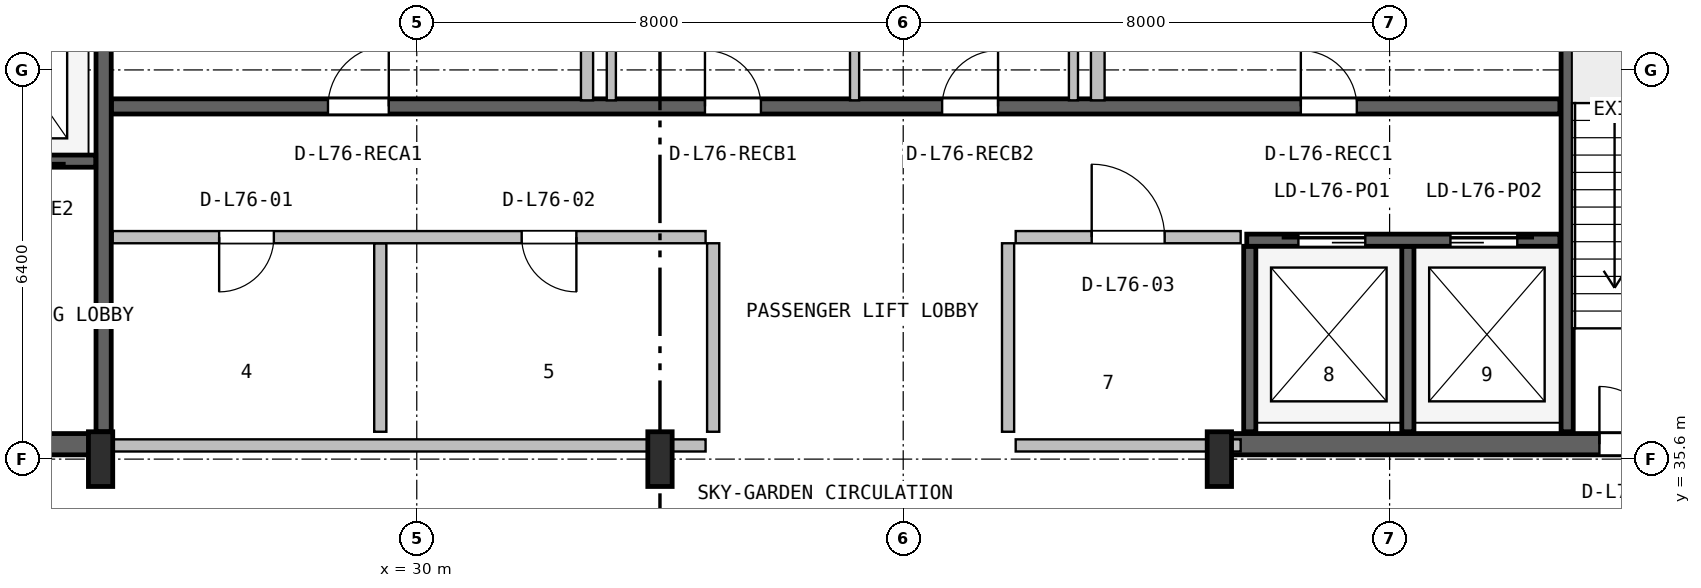
"""IFC4 building model, lengths in metres.
Left out: names, types, materials, properties, quantities, classifications, styles, units other than length and angle.
Written with IfcOpenShell. Run it as: python <this file> out.ifc"""

import sys

from ifc_helpers import new_model, si_unit, direction, frame, frame_2d, origin, origin_2d, place, context, subcontext, project, spatial, rectangle, i_section, extrude, source, transform, mapped, element, fill, save


model = new_model("IFC4")
c1 = context("Model", 3, precision=1e-05, world=origin(), true_north=direction((0.0, 1.0)))
c2 = subcontext(c1, "Body", "Model", "MODEL_VIEW")
j1 = project(units=[si_unit("LENGTHUNIT", "METRE"), si_unit("PLANEANGLEUNIT", "RADIAN")], contexts=[c1])
p1 = place(None, origin())
s1 = spatial("IfcSite", under=j1, at=p1, CompositionType="ELEMENT")
p2 = place(p1, origin())
s2 = spatial("IfcBuilding", under=s1, at=p2, CompositionType="ELEMENT")
p3 = place(p2, frame((0.0, 0.0, 305.0)))
s3 = spatial("IfcBuildingStorey", under=s2, at=p3, CompositionType="ELEMENT", Elevation=305.0)
p4 = place(p3, frame((15.67, 35.845, 0.0), z_axis=(0.0, 0.0, 1.0), x_axis=(1.0, 0.0, 0.0)))
e1 = element("IfcWall", 1, at=p4, inside=s3, PredefinedType="SHEAR", context=c2, shape_type="SweptSolid", body=[
    extrude(rectangle(XDim=9.13, YDim=0.35, at=frame_2d((4.565, 0.0))), origin(), (0.0, 0.0, 1.0), 4.52),
])
p5 = place(p4, frame((5.4, 0.0, 0.0)))
e2 = element("IfcOpeningElement", 2, at=p5, cuts=e1, PredefinedType="OPENING", context=c2, shape_type="SweptSolid", body=[
    extrude(rectangle(XDim=1.0, YDim=2.1, at=frame_2d((0.5, 1.05))), frame((0.0, 0.185, 0.0), z_axis=(0.0, -1.0, 0.0), x_axis=(1.0, 0.0, 0.0)), (0.0, 0.0, 1.0), 0.37),
])
p6 = place(p3, frame((43.2, 35.845, 0.0), z_axis=(0.0, 0.0, 1.0), x_axis=(1.0, 0.0, 0.0)))
e3 = element("IfcWall", 3, at=p6, inside=s3, PredefinedType="SHEAR", context=c2, shape_type="SweptSolid", body=[
    extrude(rectangle(XDim=9.13, YDim=0.35, at=frame_2d((4.565, 0.0))), origin(), (0.0, 0.0, 1.0), 4.52),
])
p7 = place(p6, frame((6.25, 0.0, 0.0)))
e4 = element("IfcOpeningElement", 4, at=p7, cuts=e3, PredefinedType="OPENING", context=c2, shape_type="SweptSolid", body=[
    extrude(rectangle(XDim=0.95, YDim=2.1, at=frame_2d((0.475, 1.05))), frame((0.0, 0.185, 0.0), z_axis=(0.0, -1.0, 0.0), x_axis=(1.0, 0.0, 0.0)), (0.0, 0.0, 1.0), 0.37),
])
m1 = source(origin(), c2, "Body", "SweptSolid", [
    extrude(i_section(OverallWidth=0.4, OverallDepth=0.9, WebThickness=0.016, FlangeThickness=0.028, FilletRadius=0.016, at=origin_2d()), origin(), (0.0, 0.0, 1.0), 4.8),
])
for number, where, z_axis, x_axis in (
    (5, (24.8, 35.6, 0.0), (0.0, 0.0, 1.0), (1.0, 0.0, 0.0)),
    (6, (34.0, 35.6, 0.0), (0.0, 0.0, 1.0), (1.0, 0.0, 0.0)),
    (7, (43.2, 35.6, 0.0), (0.0, 0.0, 1.0), (1.0, 0.0, 0.0)),
):
    element("IfcColumn", number, at=place(p3, frame(where, z_axis=z_axis, x_axis=x_axis)), inside=s3, PredefinedType="COLUMN", context=c2, shape_type="MappedRepresentation", body=[
        mapped(m1, transform((0.0, 0.0, 0.0), x_axis=(1.0, 0.0, 0.0), y_axis=(0.0, 1.0, 0.0), z_axis=(0.0, 0.0, 1.0), scale=1.0)),
    ])
p8 = place(p3, frame((24.85, 36.05, 0.0), z_axis=(0.0, 0.0, 1.0), x_axis=(0.0, 1.0, 0.0)))
e8 = element("IfcWall", 8, at=p8, inside=s3, PredefinedType="SHEAR", context=c2, shape_type="SweptSolid", body=[
    extrude(rectangle(XDim=10.45, YDim=0.25, at=frame_2d((5.225, 0.0))), origin(), (0.0, 0.0, 1.0), 4.52),
])
p9 = place(p3, frame((19.2, 40.5, 0.0), z_axis=(0.0, 0.0, 1.0), x_axis=(1.0, 0.0, 0.0)))
e9 = element("IfcWall", 9, at=p9, inside=s3, PredefinedType="SHEAR", context=c2, shape_type="SweptSolid", body=[
    extrude(rectangle(XDim=5.52, YDim=0.2, at=frame_2d((2.76, 0.0))), origin(), (0.0, 0.0, 1.0), 4.52),
])
p10 = place(p9, frame((1.05, 0.0, 0.0)))
e10 = element("IfcOpeningElement", 10, at=p10, cuts=e9, PredefinedType="OPENING", context=c2, shape_type="SweptSolid", body=[
    extrude(rectangle(XDim=1.1, YDim=2.18, at=frame_2d((0.55, 1.09))), frame((0.0, 0.11, 0.0), z_axis=(0.0, -1.0, 0.0), x_axis=(1.0, 0.0, 0.0)), (0.0, 0.0, 1.0), 0.22),
])
p11 = place(p9, frame((3.65, 0.0, 0.0)))
e11 = element("IfcOpeningElement", 11, at=p11, cuts=e9, PredefinedType="OPENING", context=c2, shape_type="SweptSolid", body=[
    extrude(rectangle(XDim=1.1, YDim=2.18, at=frame_2d((0.55, 1.09))), frame((0.0, 0.11, 0.0), z_axis=(0.0, -1.0, 0.0), x_axis=(1.0, 0.0, 0.0)), (0.0, 0.0, 1.0), 0.22),
])
p12 = place(p3, frame((48.92, 36.05, 0.0), z_axis=(0.0, 0.0, 1.0), x_axis=(0.0, 1.0, 0.0)))
e12 = element("IfcWall", 12, at=p12, inside=s3, PredefinedType="SHEAR", context=c2, shape_type="SweptSolid", body=[
    extrude(rectangle(XDim=10.5, YDim=0.2, at=frame_2d((5.25, 0.0))), origin(), (0.0, 0.0, 1.0), 4.52),
])
p13 = place(p3, frame((24.98, 41.4, 0.0), z_axis=(0.0, 0.0, 1.0), x_axis=(1.0, 0.0, 0.0)))
e13 = element("IfcWall", 13, at=p13, inside=s3, PredefinedType="SHEAR", context=c2, shape_type="SweptSolid", body=[
    extrude(rectangle(XDim=23.82, YDim=0.25, at=frame_2d((11.91, 0.0))), origin(), (0.0, 0.0, 1.0), 4.52),
])
p14 = place(p13, frame((3.56, 0.0, 0.0)))
e14 = element("IfcOpeningElement", 14, at=p14, cuts=e13, PredefinedType="OPENING", context=c2, shape_type="SweptSolid", body=[
    extrude(rectangle(XDim=1.0, YDim=2.08, at=frame_2d((0.5, 1.04))), frame((0.0, 0.135, 0.0), z_axis=(0.0, -1.0, 0.0), x_axis=(1.0, 0.0, 0.0)), (0.0, 0.0, 1.0), 0.27),
])
p15 = place(p13, frame((9.76, 0.0, 0.0)))
e15 = element("IfcOpeningElement", 15, at=p15, cuts=e13, PredefinedType="OPENING", context=c2, shape_type="SweptSolid", body=[
    extrude(rectangle(XDim=0.92, YDim=2.08, at=frame_2d((0.46, 1.04))), frame((0.0, 0.135, 0.0), z_axis=(0.0, -1.0, 0.0), x_axis=(1.0, 0.0, 0.0)), (0.0, 0.0, 1.0), 0.27),
])
p16 = place(p13, frame((13.66, 0.0, 0.0)))
e16 = element("IfcOpeningElement", 16, at=p16, cuts=e13, PredefinedType="OPENING", context=c2, shape_type="SweptSolid", body=[
    extrude(rectangle(XDim=0.92, YDim=2.08, at=frame_2d((0.46, 1.04))), frame((0.0, 0.135, 0.0), z_axis=(0.0, -1.0, 0.0), x_axis=(1.0, 0.0, 0.0)), (0.0, 0.0, 1.0), 0.27),
])
p17 = place(p13, frame((19.56, 0.0, 0.0)))
e17 = element("IfcOpeningElement", 17, at=p17, cuts=e13, PredefinedType="OPENING", context=c2, shape_type="SweptSolid", body=[
    extrude(rectangle(XDim=0.92, YDim=2.08, at=frame_2d((0.46, 1.04))), frame((0.0, 0.135, 0.0), z_axis=(0.0, -1.0, 0.0), x_axis=(1.0, 0.0, 0.0)), (0.0, 0.0, 1.0), 0.27),
])
for number, where, z_axis, x_axis in (
    (18, (43.7, 36.05, 0.0), (0.0, 0.0, 1.0), (0.0, 1.0, 0.0)),
    (19, (46.3, 36.05, 0.0), (0.0, 0.0, 1.0), (0.0, 1.0, 0.0)),
):
    element("IfcWall", number, at=place(p3, frame(where, z_axis=z_axis, x_axis=x_axis)), inside=s3, PredefinedType="SHEAR", context=c2, shape_type="SweptSolid", body=[
        extrude(rectangle(XDim=3.05, YDim=0.2, at=frame_2d((1.525, 0.0))), origin(), (0.0, 0.0, 1.0), 4.52),
    ])
p18 = place(p3, frame((43.65, 39.2, 0.0), z_axis=(0.0, 0.0, 1.0), x_axis=(1.0, 0.0, 0.0)))
e20 = element("IfcWall", 20, at=p18, inside=s3, PredefinedType="SHEAR", context=c2, shape_type="SweptSolid", body=[
    extrude(rectangle(XDim=5.15, YDim=0.2, at=frame_2d((2.575, 0.0))), origin(), (0.0, 0.0, 1.0), 4.52),
])
p19 = place(p18, frame((0.85, 0.0, 0.0)))
e21 = element("IfcOpeningElement", 21, at=p19, cuts=e20, PredefinedType="OPENING", context=c2, shape_type="SweptSolid", body=[
    extrude(rectangle(XDim=1.1, YDim=2.18, at=frame_2d((0.55, 1.09))), frame((0.0, 0.11, 0.0), z_axis=(0.0, -1.0, 0.0), x_axis=(1.0, 0.0, 0.0)), (0.0, 0.0, 1.0), 0.22),
])
p20 = place(p18, frame((3.35, 0.0, 0.0)))
e22 = element("IfcOpeningElement", 22, at=p20, cuts=e20, PredefinedType="OPENING", context=c2, shape_type="SweptSolid", body=[
    extrude(rectangle(XDim=1.1, YDim=2.18, at=frame_2d((0.55, 1.09))), frame((0.0, 0.11, 0.0), z_axis=(0.0, -1.0, 0.0), x_axis=(1.0, 0.0, 0.0)), (0.0, 0.0, 1.0), 0.22),
])
p21 = place(p3, frame((25.0, 35.825, 0.0), z_axis=(0.0, 0.0, 1.0), x_axis=(1.0, 0.0, 0.0)))
e23 = element("IfcWall", 23, at=p21, inside=s3, PredefinedType="PLUMBINGWALL", context=c2, shape_type="SweptSolid", body=[
    extrude(rectangle(XDim=9.75, YDim=0.2, at=frame_2d((4.875, 0.0))), origin(), (0.0, 0.0, 1.0), 3.545),
])
p22 = place(p3, frame((29.4, 36.05, 0.0), z_axis=(0.0, 0.0, 1.0), x_axis=(0.0, 1.0, 0.0)))
e24 = element("IfcWall", 24, at=p22, inside=s3, PredefinedType="PLUMBINGWALL", context=c2, shape_type="SweptSolid", body=[
    extrude(rectangle(XDim=3.1, YDim=0.2, at=frame_2d((1.55, 0.0))), origin(), (0.0, 0.0, 1.0), 4.5),
])
p23 = place(p3, frame((25.0, 39.25, 0.0), z_axis=(0.0, 0.0, 1.0), x_axis=(1.0, 0.0, 0.0)))
e25 = element("IfcWall", 25, at=p23, inside=s3, PredefinedType="PLUMBINGWALL", context=c2, shape_type="SweptSolid", body=[
    extrude(rectangle(XDim=9.75, YDim=0.2, at=frame_2d((4.875, 0.0))), origin(), (0.0, 0.0, 1.0), 4.5),
])
p24 = place(p23, frame((1.75, 0.0, 0.0)))
e26 = element("IfcOpeningElement", 26, at=p24, cuts=e25, PredefinedType="OPENING", context=c2, shape_type="SweptSolid", body=[
    extrude(rectangle(XDim=0.9, YDim=2.06, at=frame_2d((0.45, 1.03))), frame((0.0, 0.11, 0.0), z_axis=(0.0, -1.0, 0.0), x_axis=(1.0, 0.0, 0.0)), (0.0, 0.0, 1.0), 0.22),
])
p25 = place(p23, frame((6.725, 0.0, 0.0)))
e27 = element("IfcOpeningElement", 27, at=p25, cuts=e25, PredefinedType="OPENING", context=c2, shape_type="SweptSolid", body=[
    extrude(rectangle(XDim=0.9, YDim=2.06, at=frame_2d((0.45, 1.03))), frame((0.0, 0.11, 0.0), z_axis=(0.0, -1.0, 0.0), x_axis=(1.0, 0.0, 0.0)), (0.0, 0.0, 1.0), 0.22),
])
p26 = place(p3, frame((34.875, 36.05, 0.0), z_axis=(0.0, 0.0, 1.0), x_axis=(0.0, 1.0, 0.0)))
e28 = element("IfcWall", 28, at=p26, inside=s3, PredefinedType="PLUMBINGWALL", context=c2, shape_type="SweptSolid", body=[
    extrude(rectangle(XDim=3.1, YDim=0.2, at=frame_2d((1.55, 0.0))), origin(), (0.0, 0.0, 1.0), 4.5),
])
p27 = place(p3, frame((39.85, 35.825, 0.0), z_axis=(0.0, 0.0, 1.0), x_axis=(1.0, 0.0, 0.0)))
e29 = element("IfcWall", 29, at=p27, inside=s3, PredefinedType="SOLIDWALL", context=c2, shape_type="SweptSolid", body=[
    extrude(rectangle(XDim=3.7, YDim=0.2, at=frame_2d((1.85, 0.0))), origin(), (0.0, 0.0, 1.0), 3.545),
])
p28 = place(p3, frame((39.85, 39.25, 0.0), z_axis=(0.0, 0.0, 1.0), x_axis=(1.0, 0.0, 0.0)))
e30 = element("IfcWall", 30, at=p28, inside=s3, PredefinedType="SOLIDWALL", context=c2, shape_type="SweptSolid", body=[
    extrude(rectangle(XDim=3.7, YDim=0.2, at=frame_2d((1.85, 0.0))), origin(), (0.0, 0.0, 1.0), 4.5),
])
p29 = place(p28, frame((1.25, 0.0, 0.0)))
e31 = element("IfcOpeningElement", 31, at=p29, cuts=e30, PredefinedType="OPENING", context=c2, shape_type="SweptSolid", body=[
    extrude(rectangle(XDim=1.2, YDim=2.1, at=frame_2d((0.6, 1.05))), frame((0.0, 0.11, 0.0), z_axis=(0.0, -1.0, 0.0), x_axis=(1.0, 0.0, 0.0)), (0.0, 0.0, 1.0), 0.22),
])
p30 = place(p3, frame((39.725, 36.05, 0.0), z_axis=(0.0, 0.0, 1.0), x_axis=(0.0, 1.0, 0.0)))
e32 = element("IfcWall", 32, at=p30, inside=s3, PredefinedType="SOLIDWALL", context=c2, shape_type="SweptSolid", body=[
    extrude(rectangle(XDim=3.1, YDim=0.2, at=frame_2d((1.55, 0.0))), origin(), (0.0, 0.0, 1.0), 4.5),
])
p31 = place(p3, frame((32.8, 41.5, 0.0), z_axis=(0.0, 0.0, 1.0), x_axis=(0.0, 1.0, 0.0)))
e33 = element("IfcWall", 33, at=p31, inside=s3, PredefinedType="SOLIDWALL", context=c2, shape_type="SweptSolid", body=[
    extrude(rectangle(XDim=5.02, YDim=0.2, at=frame_2d((2.51, 0.0))), origin(), (0.0, 0.0, 1.0), 4.5),
])
p32 = place(p3, frame((37.2, 41.5, 0.0), z_axis=(0.0, 0.0, 1.0), x_axis=(0.0, 1.0, 0.0)))
e34 = element("IfcWall", 34, at=p32, inside=s3, PredefinedType="PARTITIONING", context=c2, shape_type="SweptSolid", body=[
    extrude(rectangle(XDim=2.325, YDim=0.15, at=frame_2d((1.163, 0.0))), origin(), (0.0, 0.0, 1.0), 4.5),
])
for number, where, z_axis, x_axis in (
    (35, (40.8, 41.5, 0.0), (0.0, 0.0, 1.0), (0.0, 1.0, 0.0)),
    (36, (33.2, 41.5, 0.0), (0.0, 0.0, 1.0), (0.0, 1.0, 0.0)),
):
    element("IfcWall", number, at=place(p3, frame(where, z_axis=z_axis, x_axis=x_axis)), inside=s3, PredefinedType="PARTITIONING", context=c2, shape_type="SweptSolid", body=[
        extrude(rectangle(XDim=5.02, YDim=0.15, at=frame_2d((2.51, 0.0))), origin(), (0.0, 0.0, 1.0), 4.5),
    ])
p33 = place(p3, frame((41.2, 41.5, 0.0), z_axis=(0.0, 0.0, 1.0), x_axis=(0.0, 1.0, 0.0)))
e37 = element("IfcWall", 37, at=p33, inside=s3, PredefinedType="PARTITIONING", context=c2, shape_type="SweptSolid", body=[
    extrude(rectangle(XDim=5.02, YDim=0.225, at=frame_2d((2.51, 0.0))), origin(), (0.0, 0.0, 1.0), 4.5),
])
m2 = source(origin(), c2, "Body", "SweptSolid", [
    extrude(rectangle(XDim=0.95, YDim=2.1, at=frame_2d((0.475, 1.05))), frame((0.0, 0.025, 0.0), z_axis=(0.0, -1.0, 0.0), x_axis=(1.0, 0.0, 0.0)), (0.0, 0.0, 1.0), 0.05),
])
p34 = place(p7, origin())
e38 = element("IfcDoor", 38, at=p34, inside=s3, OperationType="SINGLE_SWING_LEFT", PredefinedType="DOOR", context=c2, shape_type="MappedRepresentation", body=[
    mapped(m2, transform((0.0, 0.0, 0.0), x_axis=(1.0, 0.0, 0.0), y_axis=(0.0, 1.0, 0.0), z_axis=(0.0, 0.0, 1.0), scale=1.0)),
])
fill(e4, e38)
m3 = source(origin(), c2, "Body", "SweptSolid", [
    extrude(rectangle(XDim=1.0, YDim=2.08, at=frame_2d((0.5, 1.04))), frame((0.0, 0.025, 0.0), z_axis=(0.0, -1.0, 0.0), x_axis=(1.0, 0.0, 0.0)), (0.0, 0.0, 1.0), 0.05),
])
p35 = place(p14, origin())
e39 = element("IfcDoor", 39, at=p35, inside=s3, OperationType="SINGLE_SWING_RIGHT", PredefinedType="DOOR", context=c2, shape_type="MappedRepresentation", body=[
    mapped(m3, transform((0.0, 0.0, 0.0), x_axis=(1.0, 0.0, 0.0), y_axis=(0.0, 1.0, 0.0), z_axis=(0.0, 0.0, 1.0), scale=1.0)),
])
fill(e14, e39)
m4 = source(origin(), c2, "Body", "SweptSolid", [
    extrude(rectangle(XDim=0.92, YDim=2.08, at=frame_2d((0.46, 1.04))), frame((0.0, 0.025, 0.0), z_axis=(0.0, -1.0, 0.0), x_axis=(1.0, 0.0, 0.0)), (0.0, 0.0, 1.0), 0.05),
])
p36 = place(p15, origin())
e40 = element("IfcDoor", 40, at=p36, inside=s3, OperationType="SINGLE_SWING_LEFT", PredefinedType="DOOR", context=c2, shape_type="MappedRepresentation", body=[
    mapped(m4, transform((0.0, 0.0, 0.0), x_axis=(1.0, 0.0, 0.0), y_axis=(0.0, 1.0, 0.0), z_axis=(0.0, 0.0, 1.0), scale=1.0)),
])
fill(e15, e40)
p37 = place(p16, origin())
e41 = element("IfcDoor", 41, at=p37, inside=s3, OperationType="SINGLE_SWING_RIGHT", PredefinedType="DOOR", context=c2, shape_type="MappedRepresentation", body=[
    mapped(m4, transform((0.0, 0.0, 0.0), x_axis=(1.0, 0.0, 0.0), y_axis=(0.0, 1.0, 0.0), z_axis=(0.0, 0.0, 1.0), scale=1.0)),
])
fill(e16, e41)
p38 = place(p17, origin())
e42 = element("IfcDoor", 42, at=p38, inside=s3, OperationType="SINGLE_SWING_LEFT", PredefinedType="DOOR", context=c2, shape_type="MappedRepresentation", body=[
    mapped(m4, transform((0.0, 0.0, 0.0), x_axis=(1.0, 0.0, 0.0), y_axis=(0.0, 1.0, 0.0), z_axis=(0.0, 0.0, 1.0), scale=1.0)),
])
fill(e17, e42)
m5 = source(origin(), c2, "Body", "SweptSolid", [
    extrude(rectangle(XDim=1.1, YDim=2.18, at=frame_2d((0.55, 1.09))), frame((0.0, 0.025, 0.0), z_axis=(0.0, -1.0, 0.0), x_axis=(1.0, 0.0, 0.0)), (0.0, 0.0, 1.0), 0.05),
])
p39 = place(p19, origin())
e43 = element("IfcDoor", 43, at=p39, inside=s3, OperationType="SLIDING_TO_LEFT", PredefinedType="DOOR", context=c2, shape_type="MappedRepresentation", body=[
    mapped(m5, transform((0.0, 0.0, 0.0), x_axis=(1.0, 0.0, 0.0), y_axis=(0.0, 1.0, 0.0), z_axis=(0.0, 0.0, 1.0), scale=1.0)),
])
fill(e21, e43)
p40 = place(p20, origin())
e44 = element("IfcDoor", 44, at=p40, inside=s3, OperationType="SLIDING_TO_RIGHT", PredefinedType="DOOR", context=c2, shape_type="MappedRepresentation", body=[
    mapped(m5, transform((0.0, 0.0, 0.0), x_axis=(1.0, 0.0, 0.0), y_axis=(0.0, 1.0, 0.0), z_axis=(0.0, 0.0, 1.0), scale=1.0)),
])
fill(e22, e44)
m6 = source(origin(), c2, "Body", "SweptSolid", [
    extrude(rectangle(XDim=0.9, YDim=2.06, at=frame_2d((0.45, 1.03))), frame((0.0, 0.025, 0.0), z_axis=(0.0, -1.0, 0.0), x_axis=(1.0, 0.0, 0.0)), (0.0, 0.0, 1.0), 0.05),
])
p41 = place(p24, frame((0.9, 0.0, 0.0), z_axis=(0.0, 0.0, 1.0), x_axis=(-1.0, 0.0, 0.0)))
e45 = element("IfcDoor", 45, at=p41, inside=s3, OperationType="SINGLE_SWING_LEFT", PredefinedType="DOOR", context=c2, shape_type="MappedRepresentation", body=[
    mapped(m6, transform((0.0, 0.0, 0.0), x_axis=(1.0, 0.0, 0.0), y_axis=(0.0, 1.0, 0.0), z_axis=(0.0, 0.0, 1.0), scale=1.0)),
])
fill(e26, e45)
p42 = place(p25, frame((0.9, 0.0, 0.0), z_axis=(0.0, 0.0, 1.0), x_axis=(-1.0, 0.0, 0.0)))
e46 = element("IfcDoor", 46, at=p42, inside=s3, OperationType="SINGLE_SWING_RIGHT", PredefinedType="DOOR", context=c2, shape_type="MappedRepresentation", body=[
    mapped(m6, transform((0.0, 0.0, 0.0), x_axis=(1.0, 0.0, 0.0), y_axis=(0.0, 1.0, 0.0), z_axis=(0.0, 0.0, 1.0), scale=1.0)),
])
fill(e27, e46)
m7 = source(origin(), c2, "Body", "SweptSolid", [
    extrude(rectangle(XDim=1.2, YDim=2.1, at=frame_2d((0.6, 1.05))), frame((0.0, 0.025, 0.0), z_axis=(0.0, -1.0, 0.0), x_axis=(1.0, 0.0, 0.0)), (0.0, 0.0, 1.0), 0.05),
])
p43 = place(p29, origin())
e47 = element("IfcDoor", 47, at=p43, inside=s3, OperationType="SINGLE_SWING_LEFT", PredefinedType="DOOR", context=c2, shape_type="MappedRepresentation", body=[
    mapped(m7, transform((0.0, 0.0, 0.0), x_axis=(1.0, 0.0, 0.0), y_axis=(0.0, 1.0, 0.0), z_axis=(0.0, 0.0, 1.0), scale=1.0)),
])
fill(e31, e47)
save(model, sys.argv[1])
